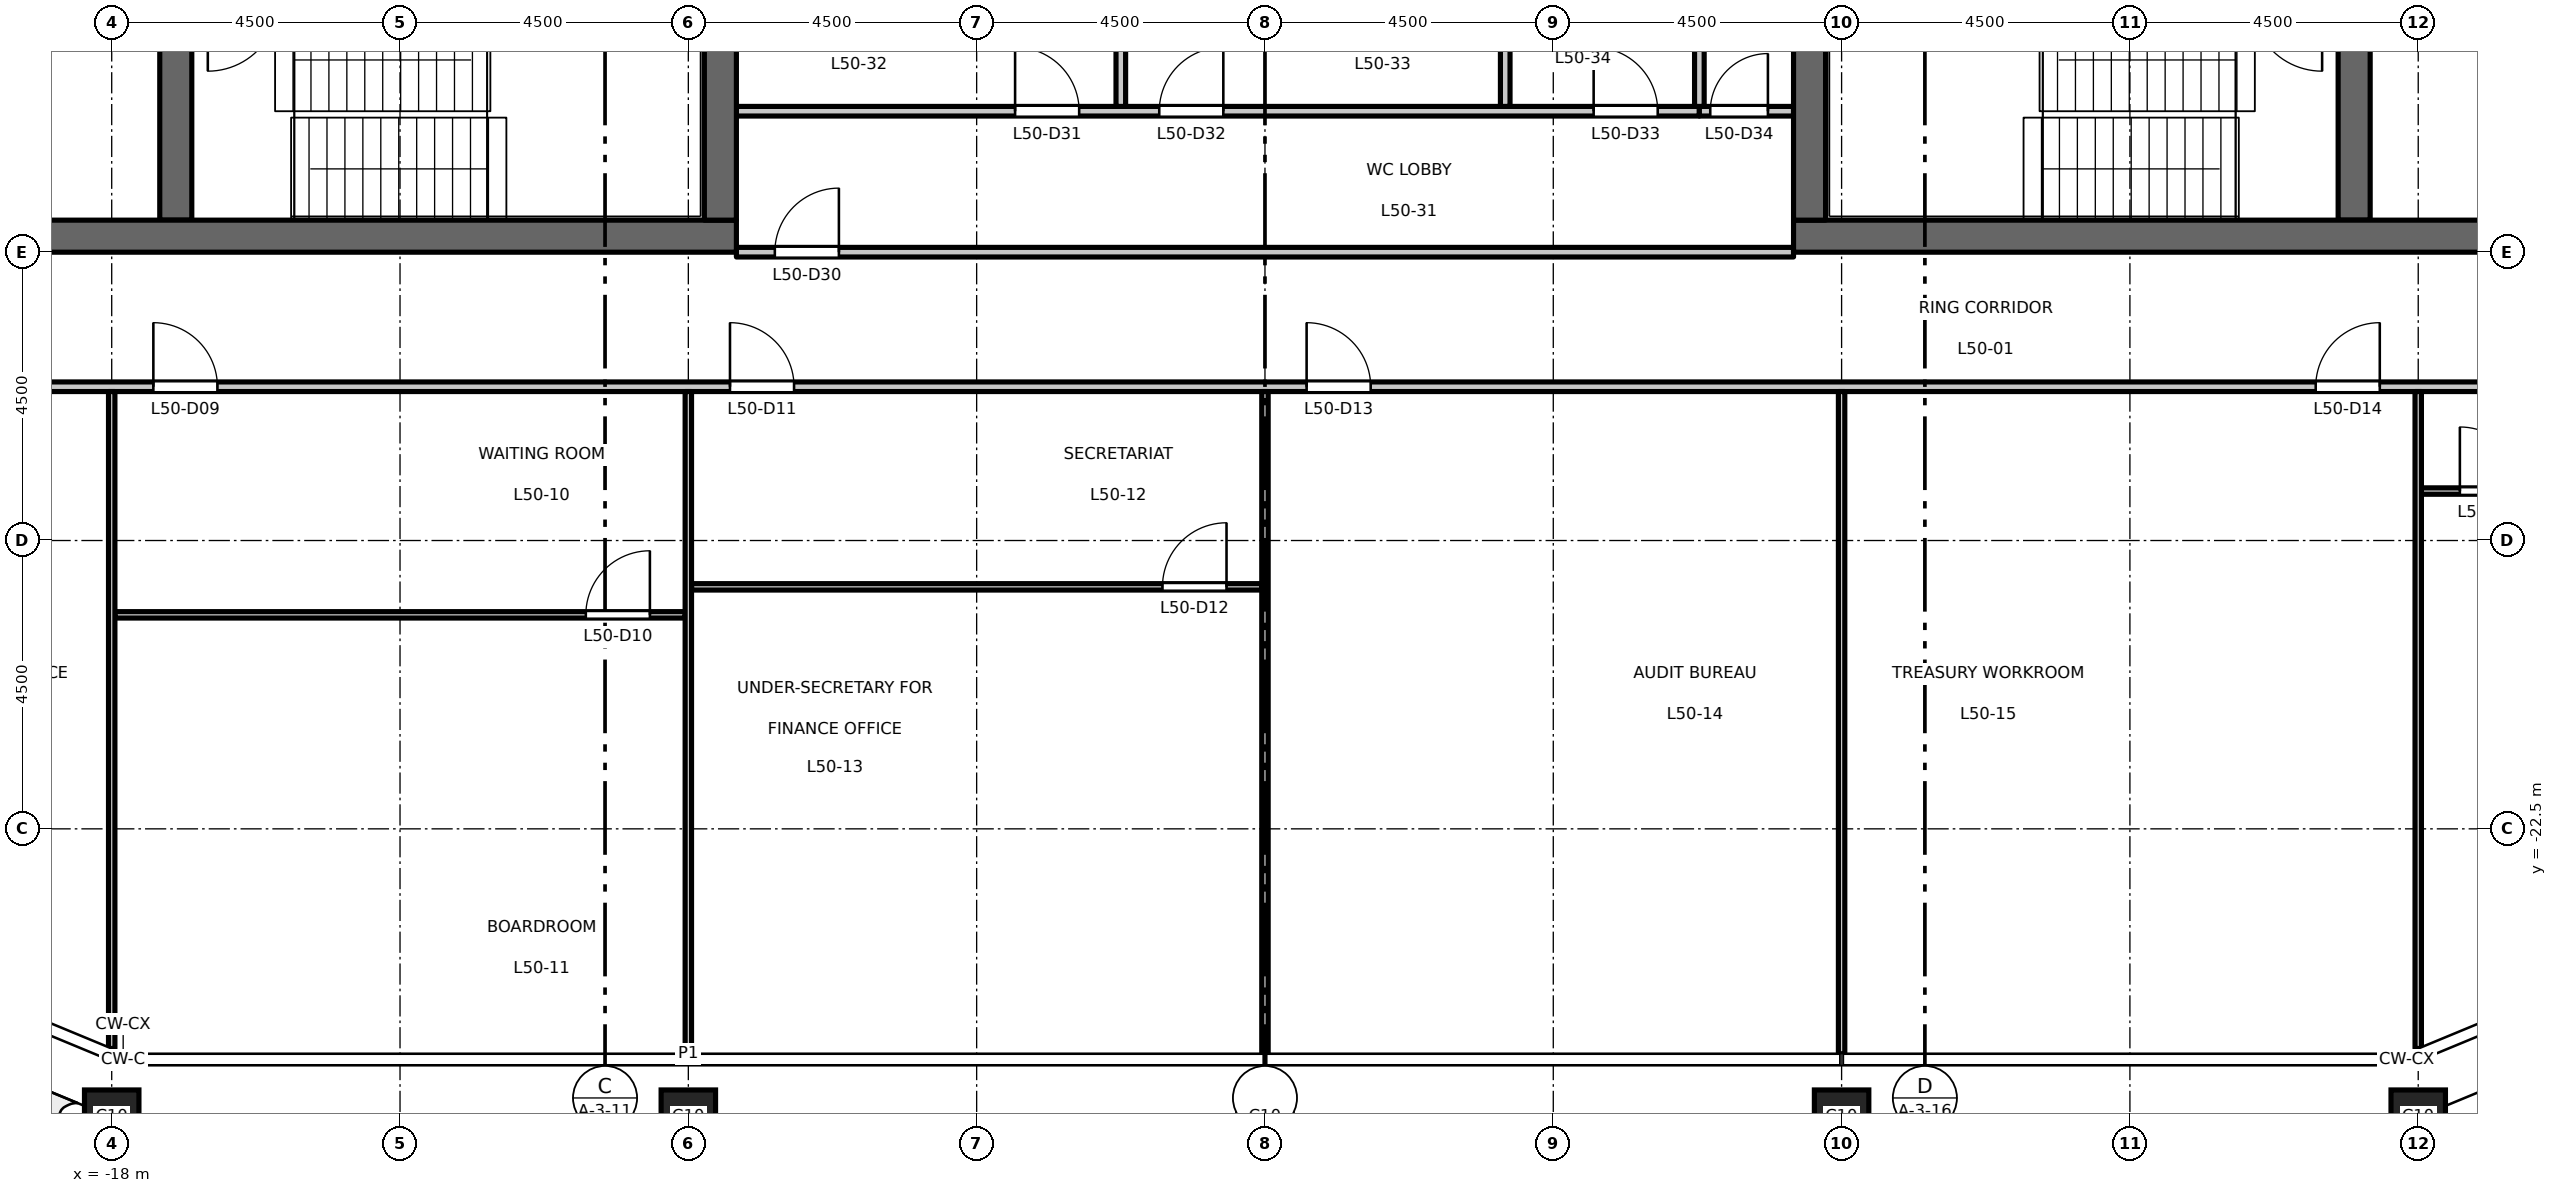
"""IFC4 building model, lengths in metres.
Left out: names, types, materials, properties, quantities, classifications, styles, units other than length and angle.
Written with IfcOpenShell. Run it as: python <this file> out.ifc"""

import sys

from ifc_helpers import new_model, si_unit, direction, frame, frame_2d, origin, origin_2d, place, context, subcontext, project, spatial, rectangle, hollow_rectangle, extrude, element, fill, save


model = new_model("IFC4")
c1 = context("Model", 3, precision=1e-05, world=origin(), true_north=direction((0.0, 1.0)))
c2 = subcontext(c1, "Body", "Model", "MODEL_VIEW")
j1 = project(units=[si_unit("LENGTHUNIT", "METRE"), si_unit("PLANEANGLEUNIT", "RADIAN")], contexts=[c1])
p1 = place(None, origin())
s1 = spatial("IfcSite", under=j1, at=p1, CompositionType="ELEMENT")
p2 = place(p1, origin())
s2 = spatial("IfcBuilding", under=s1, at=p2, CompositionType="ELEMENT")
p3 = place(p2, frame((0.0, 0.0, 233.2)))
s3 = spatial("IfcBuildingStorey", under=s2, at=p3, CompositionType="ELEMENT", Elevation=233.2)
for number, where, z_axis, x_axis in (
    (1, (-18.0, -27.0, 0.0), (0.0, 0.0, 1.0), (1.0, 0.0, 0.0)),
    (2, (-9.0, -27.0, 0.0), (0.0, 0.0, 1.0), (1.0, 0.0, 0.0)),
    (3, (0.0, -27.0, 0.0), (0.0, 0.0, 1.0), (1.0, 0.0, 0.0)),
    (4, (9.0, -27.0, 0.0), (0.0, 0.0, 1.0), (1.0, 0.0, 0.0)),
    (5, (18.0, -27.0, 0.0), (0.0, 0.0, 1.0), (1.0, 0.0, 0.0)),
):
    element("IfcColumn", number, at=place(p3, frame(where, z_axis=z_axis, x_axis=x_axis)), inside=s3, PredefinedType="COLUMN", context=c2, shape_type="SweptSolid", body=[
        extrude(hollow_rectangle(XDim=0.85, YDim=0.85, WallThickness=0.05, at=origin_2d()), origin(), (0.0, 0.0, 1.0), 4.5),
    ])
p4 = place(p3, frame((-17.0, -13.0, 0.0), z_axis=(0.0, 0.0, 1.0), x_axis=(0.0, 1.0, 0.0)))
e6 = element("IfcWall", 6, at=p4, inside=s3, PredefinedType="SHEAR", context=c2, shape_type="SweptSolid", body=[
    extrude(rectangle(XDim=6.575, YDim=0.5, at=frame_2d((3.288, 0.0))), origin(), (0.0, 0.0, 1.0), 4.35),
])
p5 = place(p3, frame((-8.25, -13.25, 0.0), z_axis=(0.0, 0.0, 1.0), x_axis=(-1.0, 0.0, 0.0)))
e7 = element("IfcWall", 7, at=p5, inside=s3, PredefinedType="SHEAR", context=c2, shape_type="SweptSolid", body=[
    extrude(rectangle(XDim=13.5, YDim=0.5, at=frame_2d((6.75, 0.0))), origin(), (0.0, 0.0, 1.0), 4.35),
])
p6 = place(p3, frame((-8.5, -13.0, 0.0), z_axis=(0.0, 0.0, 1.0), x_axis=(0.0, 1.0, 0.0)))
e8 = element("IfcWall", 8, at=p6, inside=s3, PredefinedType="SHEAR", context=c2, shape_type="SweptSolid", body=[
    extrude(rectangle(XDim=26.0, YDim=0.5, at=frame_2d((13.0, 0.0))), origin(), (0.0, 0.0, 1.0), 4.35),
])
p7 = place(p3, frame((17.0, -13.0, 0.0), z_axis=(0.0, 0.0, 1.0), x_axis=(0.0, 1.0, 0.0)))
e9 = element("IfcWall", 9, at=p7, inside=s3, PredefinedType="SHEAR", context=c2, shape_type="SweptSolid", body=[
    extrude(rectangle(XDim=6.575, YDim=0.5, at=frame_2d((3.288, 0.0))), origin(), (0.0, 0.0, 1.0), 4.35),
])
p8 = place(p3, frame((8.25, -13.25, 0.0), z_axis=(0.0, 0.0, 1.0), x_axis=(1.0, 0.0, 0.0)))
e10 = element("IfcWall", 10, at=p8, inside=s3, PredefinedType="SHEAR", context=c2, shape_type="SweptSolid", body=[
    extrude(rectangle(XDim=13.5, YDim=0.5, at=frame_2d((6.75, 0.0))), origin(), (0.0, 0.0, 1.0), 4.35),
])
p9 = place(p3, frame((8.5, -13.0, 0.0), z_axis=(0.0, 0.0, 1.0), x_axis=(0.0, 1.0, 0.0)))
e11 = element("IfcWall", 11, at=p9, inside=s3, PredefinedType="SHEAR", context=c2, shape_type="SweptSolid", body=[
    extrude(rectangle(XDim=26.0, YDim=0.5, at=frame_2d((13.0, 0.0))), origin(), (0.0, 0.0, 1.0), 4.35),
])
p10 = place(p3, frame((-17.95, -19.16, 0.0), z_axis=(0.0, 0.0, 1.0), x_axis=(1.0, 0.0, 0.0)))
e12 = element("IfcWall", 12, at=p10, inside=s3, PredefinedType="PARTITIONING", context=c2, shape_type="SweptSolid", body=[
    extrude(rectangle(XDim=8.9, YDim=0.1, at=frame_2d((4.45, 0.0))), origin(), (0.0, 0.0, 1.0), 4.35),
])
p11 = place(p10, frame((7.35, 0.0, 0.0)))
e13 = element("IfcOpeningElement", 13, at=p11, cuts=e12, PredefinedType="OPENING", context=c2, shape_type="SweptSolid", body=[
    extrude(rectangle(XDim=1.0, YDim=2.1, at=frame_2d((0.5, 1.05))), frame((0.0, 0.06, 0.0), z_axis=(0.0, -1.0, 0.0), x_axis=(1.0, 0.0, 0.0)), (0.0, 0.0, 1.0), 0.12),
])
p12 = place(p3, frame((-8.95, -18.723, 0.0), z_axis=(0.0, 0.0, 1.0), x_axis=(1.0, 0.0, 0.0)))
e14 = element("IfcWall", 14, at=p12, inside=s3, PredefinedType="PARTITIONING", context=c2, shape_type="SweptSolid", body=[
    extrude(rectangle(XDim=8.9, YDim=0.1, at=frame_2d((4.45, 0.0))), origin(), (0.0, 0.0, 1.0), 4.35),
])
p13 = place(p12, frame((7.35, 0.0, 0.0)))
e15 = element("IfcOpeningElement", 15, at=p13, cuts=e14, PredefinedType="OPENING", context=c2, shape_type="SweptSolid", body=[
    extrude(rectangle(XDim=1.0, YDim=2.1, at=frame_2d((0.5, 1.05))), frame((0.0, 0.06, 0.0), z_axis=(0.0, -1.0, 0.0), x_axis=(1.0, 0.0, 0.0)), (0.0, 0.0, 1.0), 0.12),
])
p14 = place(p3, frame((18.05, -17.228, 0.0), z_axis=(0.0, 0.0, 1.0), x_axis=(1.0, 0.0, 0.0)))
e16 = element("IfcWall", 16, at=p14, inside=s3, PredefinedType="PARTITIONING", context=c2, shape_type="SweptSolid", body=[
    extrude(rectangle(XDim=7.96, YDim=0.1, at=frame_2d((3.98, 0.0))), origin(), (0.0, 0.0, 1.0), 4.35),
])
p15 = place(p14, frame((0.6, 0.0, 0.0)))
e17 = element("IfcOpeningElement", 17, at=p15, cuts=e16, PredefinedType="OPENING", context=c2, shape_type="SweptSolid", body=[
    extrude(rectangle(XDim=1.0, YDim=2.1, at=frame_2d((0.5, 1.05))), frame((0.0, 0.06, 0.0), z_axis=(0.0, -1.0, 0.0), x_axis=(1.0, 0.0, 0.0)), (0.0, 0.0, 1.0), 0.12),
])
p16 = place(p3, frame((-23.925, -15.6, 0.0), z_axis=(0.0, 0.0, 1.0), x_axis=(1.0, 0.0, 0.0)))
e18 = element("IfcWall", 18, at=p16, inside=s3, PredefinedType="PARTITIONING", context=c2, shape_type="SweptSolid", body=[
    extrude(rectangle(XDim=47.85, YDim=0.15, at=frame_2d((23.925, 0.0))), origin(), (0.0, 0.0, 1.0), 4.35),
])
p17 = place(p16, frame((6.575, 0.0, 0.0)))
e19 = element("IfcOpeningElement", 19, at=p17, cuts=e18, PredefinedType="OPENING", context=c2, shape_type="SweptSolid", body=[
    extrude(rectangle(XDim=1.0, YDim=2.1, at=frame_2d((0.5, 1.05))), frame((0.0, 0.085, 0.0), z_axis=(0.0, -1.0, 0.0), x_axis=(1.0, 0.0, 0.0)), (0.0, 0.0, 1.0), 0.17),
])
p18 = place(p16, frame((15.575, 0.0, 0.0)))
e20 = element("IfcOpeningElement", 20, at=p18, cuts=e18, PredefinedType="OPENING", context=c2, shape_type="SweptSolid", body=[
    extrude(rectangle(XDim=1.0, YDim=2.1, at=frame_2d((0.5, 1.05))), frame((0.0, 0.085, 0.0), z_axis=(0.0, -1.0, 0.0), x_axis=(1.0, 0.0, 0.0)), (0.0, 0.0, 1.0), 0.17),
])
p19 = place(p16, frame((24.575, 0.0, 0.0)))
e21 = element("IfcOpeningElement", 21, at=p19, cuts=e18, PredefinedType="OPENING", context=c2, shape_type="SweptSolid", body=[
    extrude(rectangle(XDim=1.0, YDim=2.1, at=frame_2d((0.5, 1.05))), frame((0.0, 0.085, 0.0), z_axis=(0.0, -1.0, 0.0), x_axis=(1.0, 0.0, 0.0)), (0.0, 0.0, 1.0), 0.17),
])
p20 = place(p16, frame((40.325, 0.0, 0.0)))
e22 = element("IfcOpeningElement", 22, at=p20, cuts=e18, PredefinedType="OPENING", context=c2, shape_type="SweptSolid", body=[
    extrude(rectangle(XDim=1.0, YDim=2.1, at=frame_2d((0.5, 1.05))), frame((0.0, 0.085, 0.0), z_axis=(0.0, -1.0, 0.0), x_axis=(1.0, 0.0, 0.0)), (0.0, 0.0, 1.0), 0.17),
])
p21 = place(p16, frame((0.725, 0.0, 0.0)))
e23 = element("IfcOpeningElement", 23, at=p21, cuts=e18, PredefinedType="OPENING", context=c2, shape_type="SweptSolid", body=[
    extrude(rectangle(XDim=1.0, YDim=2.1, at=frame_2d((0.5, 1.05))), frame((0.0, 0.085, 0.0), z_axis=(0.0, -1.0, 0.0), x_axis=(1.0, 0.0, 0.0)), (0.0, 0.0, 1.0), 0.17),
])
p22 = place(p16, frame((46.075, 0.0, 0.0)))
e24 = element("IfcOpeningElement", 24, at=p22, cuts=e18, PredefinedType="OPENING", context=c2, shape_type="SweptSolid", body=[
    extrude(rectangle(XDim=1.0, YDim=2.1, at=frame_2d((0.5, 1.05))), frame((0.0, 0.085, 0.0), z_axis=(0.0, -1.0, 0.0), x_axis=(1.0, 0.0, 0.0)), (0.0, 0.0, 1.0), 0.17),
])
p23 = place(p3, frame((-8.25, -13.5, 0.0), z_axis=(0.0, 0.0, 1.0), x_axis=(1.0, 0.0, 0.0)))
e25 = element("IfcWall", 25, at=p23, inside=s3, PredefinedType="PARTITIONING", context=c2, shape_type="SweptSolid", body=[
    extrude(rectangle(XDim=16.5, YDim=0.15, at=frame_2d((8.25, 0.0))), origin(), (0.0, 0.0, 1.0), 3.95),
])
p24 = place(p23, frame((0.6, 0.0, 0.0)))
e26 = element("IfcOpeningElement", 26, at=p24, cuts=e25, PredefinedType="OPENING", context=c2, shape_type="SweptSolid", body=[
    extrude(rectangle(XDim=1.0, YDim=2.1, at=frame_2d((0.5, 1.05))), frame((0.0, 0.085, 0.0), z_axis=(0.0, -1.0, 0.0), x_axis=(1.0, 0.0, 0.0)), (0.0, 0.0, 1.0), 0.17),
])
p25 = place(p3, frame((-8.25, -11.3, 0.0), z_axis=(0.0, 0.0, 1.0), x_axis=(1.0, 0.0, 0.0)))
e27 = element("IfcWall", 27, at=p25, inside=s3, PredefinedType="PARTITIONING", context=c2, shape_type="SweptSolid", body=[
    extrude(rectangle(XDim=15.03, YDim=0.15, at=frame_2d((7.515, 0.0))), origin(), (0.0, 0.0, 1.0), 4.35),
])
p26 = place(p25, frame((4.35, 0.0, 0.0)))
e28 = element("IfcOpeningElement", 28, at=p26, cuts=e27, PredefinedType="OPENING", context=c2, shape_type="SweptSolid", body=[
    extrude(rectangle(XDim=1.0, YDim=2.1, at=frame_2d((0.5, 1.05))), frame((0.0, 0.085, 0.0), z_axis=(0.0, -1.0, 0.0), x_axis=(1.0, 0.0, 0.0)), (0.0, 0.0, 1.0), 0.17),
])
p27 = place(p25, frame((6.6, 0.0, 0.0)))
e29 = element("IfcOpeningElement", 29, at=p27, cuts=e27, PredefinedType="OPENING", context=c2, shape_type="SweptSolid", body=[
    extrude(rectangle(XDim=1.0, YDim=2.1, at=frame_2d((0.5, 1.05))), frame((0.0, 0.085, 0.0), z_axis=(0.0, -1.0, 0.0), x_axis=(1.0, 0.0, 0.0)), (0.0, 0.0, 1.0), 0.17),
])
p28 = place(p25, frame((13.38, 0.0, 0.0)))
e30 = element("IfcOpeningElement", 30, at=p28, cuts=e27, PredefinedType="OPENING", context=c2, shape_type="SweptSolid", body=[
    extrude(rectangle(XDim=1.0, YDim=2.1, at=frame_2d((0.5, 1.05))), frame((0.0, 0.085, 0.0), z_axis=(0.0, -1.0, 0.0), x_axis=(1.0, 0.0, 0.0)), (0.0, 0.0, 1.0), 0.17),
])
p29 = place(p3, frame((6.78, -11.3, 0.0), z_axis=(0.0, 0.0, 1.0), x_axis=(1.0, 0.0, 0.0)))
e31 = element("IfcWall", 31, at=p29, inside=s3, PredefinedType="PARTITIONING", context=c2, shape_type="SweptSolid", body=[
    extrude(rectangle(XDim=1.47, YDim=0.15, at=frame_2d((0.735, 0.0))), origin(), (0.0, 0.0, 1.0), 4.35),
])
p30 = place(p29, frame((0.17, 0.0, 0.0)))
e32 = element("IfcOpeningElement", 32, at=p30, cuts=e31, PredefinedType="OPENING", context=c2, shape_type="SweptSolid", body=[
    extrude(rectangle(XDim=0.9, YDim=2.1, at=frame_2d((0.45, 1.05))), frame((0.0, 0.085, 0.0), z_axis=(0.0, -1.0, 0.0), x_axis=(1.0, 0.0, 0.0)), (0.0, 0.0, 1.0), 0.17),
])
p31 = place(p3, frame((-18.0, -25.928, 0.0), z_axis=(0.0, 0.0, 1.0), x_axis=(0.0, 1.0, 0.0)))
e33 = element("IfcWall", 33, at=p31, inside=s3, PredefinedType="PARTITIONING", context=c2, shape_type="SweptSolid", body=[
    extrude(rectangle(XDim=10.253, YDim=0.1, at=frame_2d((5.126, 0.0))), origin(), (0.0, 0.0, 1.0), 3.65),
])
p32 = place(p3, frame((-9.0, -26.01, 0.0), z_axis=(0.0, 0.0, 1.0), x_axis=(0.0, 1.0, 0.0)))
e34 = element("IfcWall", 34, at=p32, inside=s3, PredefinedType="PARTITIONING", context=c2, shape_type="SweptSolid", body=[
    extrude(rectangle(XDim=10.335, YDim=0.1, at=frame_2d((5.167, 0.0))), origin(), (0.0, 0.0, 1.0), 3.65),
])
p33 = place(p3, frame((-2.25, -11.225, 0.0), z_axis=(0.0, 0.0, 1.0), x_axis=(0.0, 1.0, 0.0)))
e35 = element("IfcWall", 35, at=p33, inside=s3, PredefinedType="PARTITIONING", context=c2, shape_type="SweptSolid", body=[
    extrude(rectangle(XDim=2.855, YDim=0.15, at=frame_2d((1.427, 0.0))), origin(), (0.0, 0.0, 1.0), 4.35),
])
p34 = place(p3, frame((0.0, -26.01, 0.0), z_axis=(0.0, 0.0, 1.0), x_axis=(0.0, 1.0, 0.0)))
e36 = element("IfcWall", 36, at=p34, inside=s3, PredefinedType="PARTITIONING", context=c2, shape_type="SweptSolid", body=[
    extrude(rectangle(XDim=10.335, YDim=0.1, at=frame_2d((5.167, 0.0))), origin(), (0.0, 0.0, 1.0), 3.55),
])
p35 = place(p3, frame((3.75, -11.225, 0.0), z_axis=(0.0, 0.0, 1.0), x_axis=(0.0, 1.0, 0.0)))
e37 = element("IfcWall", 37, at=p35, inside=s3, PredefinedType="PARTITIONING", context=c2, shape_type="SweptSolid", body=[
    extrude(rectangle(XDim=2.855, YDim=0.15, at=frame_2d((1.427, 0.0))), origin(), (0.0, 0.0, 1.0), 4.35),
])
p36 = place(p3, frame((6.78, -11.225, 0.0), z_axis=(0.0, 0.0, 1.0), x_axis=(0.0, 1.0, 0.0)))
e38 = element("IfcWall", 38, at=p36, inside=s3, PredefinedType="PARTITIONING", context=c2, shape_type="SweptSolid", body=[
    extrude(rectangle(XDim=3.138, YDim=0.15, at=frame_2d((1.569, 0.0))), origin(), (0.0, 0.0, 1.0), 4.35),
])
p37 = place(p3, frame((9.0, -26.01, 0.0), z_axis=(0.0, 0.0, 1.0), x_axis=(0.0, 1.0, 0.0)))
e39 = element("IfcWall", 39, at=p37, inside=s3, PredefinedType="PARTITIONING", context=c2, shape_type="SweptSolid", body=[
    extrude(rectangle(XDim=10.335, YDim=0.1, at=frame_2d((5.167, 0.0))), origin(), (0.0, 0.0, 1.0), 3.65),
])
p38 = place(p3, frame((18.0, -25.928, 0.0), z_axis=(0.0, 0.0, 1.0), x_axis=(0.0, 1.0, 0.0)))
e40 = element("IfcWall", 40, at=p38, inside=s3, PredefinedType="PARTITIONING", context=c2, shape_type="SweptSolid", body=[
    extrude(rectangle(XDim=10.253, YDim=0.1, at=frame_2d((5.126, 0.0))), origin(), (0.0, 0.0, 1.0), 3.65),
])
p39 = place(p17, origin())
e41 = element("IfcDoor", 41, at=p39, inside=s3, OperationType="SINGLE_SWING_LEFT", PredefinedType="DOOR", context=c2, shape_type="SweptSolid", body=[
    extrude(rectangle(XDim=1.0, YDim=2.1, at=frame_2d((0.5, 1.05))), frame((0.0, 0.025, 0.0), z_axis=(0.0, -1.0, 0.0), x_axis=(1.0, 0.0, 0.0)), (0.0, 0.0, 1.0), 0.05),
])
fill(e19, e41)
p40 = place(p11, origin())
e42 = element("IfcDoor", 42, at=p40, inside=s3, OperationType="SINGLE_SWING_RIGHT", PredefinedType="DOOR", context=c2, shape_type="SweptSolid", body=[
    extrude(rectangle(XDim=1.0, YDim=2.1, at=frame_2d((0.5, 1.05))), frame((0.0, 0.025, 0.0), z_axis=(0.0, -1.0, 0.0), x_axis=(1.0, 0.0, 0.0)), (0.0, 0.0, 1.0), 0.05),
])
fill(e13, e42)
p41 = place(p18, origin())
e43 = element("IfcDoor", 43, at=p41, inside=s3, OperationType="SINGLE_SWING_LEFT", PredefinedType="DOOR", context=c2, shape_type="SweptSolid", body=[
    extrude(rectangle(XDim=1.0, YDim=2.1, at=frame_2d((0.5, 1.05))), frame((0.0, 0.025, 0.0), z_axis=(0.0, -1.0, 0.0), x_axis=(1.0, 0.0, 0.0)), (0.0, 0.0, 1.0), 0.05),
])
fill(e20, e43)
p42 = place(p13, origin())
e44 = element("IfcDoor", 44, at=p42, inside=s3, OperationType="SINGLE_SWING_RIGHT", PredefinedType="DOOR", context=c2, shape_type="SweptSolid", body=[
    extrude(rectangle(XDim=1.0, YDim=2.1, at=frame_2d((0.5, 1.05))), frame((0.0, 0.025, 0.0), z_axis=(0.0, -1.0, 0.0), x_axis=(1.0, 0.0, 0.0)), (0.0, 0.0, 1.0), 0.05),
])
fill(e15, e44)
p43 = place(p19, origin())
e45 = element("IfcDoor", 45, at=p43, inside=s3, OperationType="SINGLE_SWING_LEFT", PredefinedType="DOOR", context=c2, shape_type="SweptSolid", body=[
    extrude(rectangle(XDim=1.0, YDim=2.1, at=frame_2d((0.5, 1.05))), frame((0.0, 0.025, 0.0), z_axis=(0.0, -1.0, 0.0), x_axis=(1.0, 0.0, 0.0)), (0.0, 0.0, 1.0), 0.05),
])
fill(e21, e45)
p44 = place(p20, origin())
e46 = element("IfcDoor", 46, at=p44, inside=s3, OperationType="SINGLE_SWING_RIGHT", PredefinedType="DOOR", context=c2, shape_type="SweptSolid", body=[
    extrude(rectangle(XDim=1.0, YDim=2.1, at=frame_2d((0.5, 1.05))), frame((0.0, 0.025, 0.0), z_axis=(0.0, -1.0, 0.0), x_axis=(1.0, 0.0, 0.0)), (0.0, 0.0, 1.0), 0.05),
])
fill(e22, e46)
p45 = place(p15, origin())
e47 = element("IfcDoor", 47, at=p45, inside=s3, OperationType="SINGLE_SWING_LEFT", PredefinedType="DOOR", context=c2, shape_type="SweptSolid", body=[
    extrude(rectangle(XDim=1.0, YDim=2.1, at=frame_2d((0.5, 1.05))), frame((0.0, 0.025, 0.0), z_axis=(0.0, -1.0, 0.0), x_axis=(1.0, 0.0, 0.0)), (0.0, 0.0, 1.0), 0.05),
])
fill(e17, e47)
p46 = place(p24, origin())
e48 = element("IfcDoor", 48, at=p46, inside=s3, OperationType="SINGLE_SWING_RIGHT", PredefinedType="DOOR", context=c2, shape_type="SweptSolid", body=[
    extrude(rectangle(XDim=1.0, YDim=2.1, at=frame_2d((0.5, 1.05))), frame((0.0, 0.025, 0.0), z_axis=(0.0, -1.0, 0.0), x_axis=(1.0, 0.0, 0.0)), (0.0, 0.0, 1.0), 0.05),
])
fill(e26, e48)
p47 = place(p26, origin())
e49 = element("IfcDoor", 49, at=p47, inside=s3, OperationType="SINGLE_SWING_LEFT", PredefinedType="DOOR", context=c2, shape_type="SweptSolid", body=[
    extrude(rectangle(XDim=1.0, YDim=2.1, at=frame_2d((0.5, 1.05))), frame((0.0, 0.025, 0.0), z_axis=(0.0, -1.0, 0.0), x_axis=(1.0, 0.0, 0.0)), (0.0, 0.0, 1.0), 0.05),
])
fill(e28, e49)
p48 = place(p27, origin())
e50 = element("IfcDoor", 50, at=p48, inside=s3, OperationType="SINGLE_SWING_RIGHT", PredefinedType="DOOR", context=c2, shape_type="SweptSolid", body=[
    extrude(rectangle(XDim=1.0, YDim=2.1, at=frame_2d((0.5, 1.05))), frame((0.0, 0.025, 0.0), z_axis=(0.0, -1.0, 0.0), x_axis=(1.0, 0.0, 0.0)), (0.0, 0.0, 1.0), 0.05),
])
fill(e29, e50)
p49 = place(p28, origin())
e51 = element("IfcDoor", 51, at=p49, inside=s3, OperationType="SINGLE_SWING_LEFT", PredefinedType="DOOR", context=c2, shape_type="SweptSolid", body=[
    extrude(rectangle(XDim=1.0, YDim=2.1, at=frame_2d((0.5, 1.05))), frame((0.0, 0.025, 0.0), z_axis=(0.0, -1.0, 0.0), x_axis=(1.0, 0.0, 0.0)), (0.0, 0.0, 1.0), 0.05),
])
fill(e30, e51)
p50 = place(p30, origin())
e52 = element("IfcDoor", 52, at=p50, inside=s3, OperationType="SINGLE_SWING_RIGHT", PredefinedType="DOOR", context=c2, shape_type="SweptSolid", body=[
    extrude(rectangle(XDim=0.9, YDim=2.1, at=frame_2d((0.45, 1.05))), frame((0.0, 0.025, 0.0), z_axis=(0.0, -1.0, 0.0), x_axis=(1.0, 0.0, 0.0)), (0.0, 0.0, 1.0), 0.05),
])
fill(e32, e52)
save(model, sys.argv[1])
